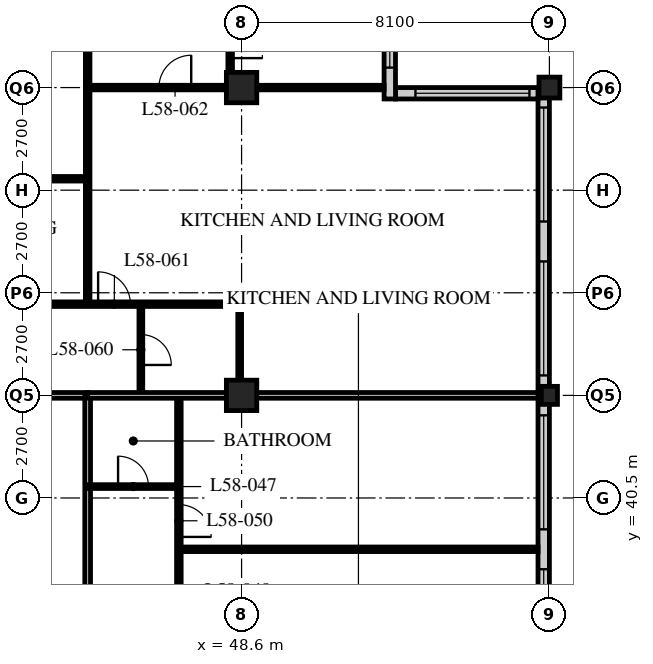
"""IFC4 building model, lengths in metres.
Left out: names, types, materials, properties, quantities, classifications, styles, units other than length and angle.
Written with IfcOpenShell. Run it as: python <this file> out.ifc"""

import sys

from ifc_helpers import new_model, si_unit, direction, frame, frame_2d, origin, origin_2d, place, context, subcontext, project, spatial, rectangle, hollow_rectangle, i_section, extrude, element, fill, save


model = new_model("IFC4")
c1 = context("Model", 3, precision=1e-05, world=origin(), true_north=direction((0.0, 1.0)))
c2 = subcontext(c1, "Body", "Model", "MODEL_VIEW")
j1 = project(units=[si_unit("LENGTHUNIT", "METRE"), si_unit("PLANEANGLEUNIT", "RADIAN")], contexts=[c1])
p1 = place(None, origin())
s1 = spatial("IfcSite", under=j1, at=p1, CompositionType="ELEMENT")
p2 = place(p1, origin())
s2 = spatial("IfcBuilding", under=s1, at=p2, CompositionType="ELEMENT")
p3 = place(p2, frame((0.0, 0.0, 224.4)))
s3 = spatial("IfcBuildingStorey", under=s2, at=p3, CompositionType="ELEMENT", Elevation=224.4)
for number, where, z_axis, x_axis in (
    (1, (48.6, 43.2, 0.0), (0.0, 0.0, 1.0), (1.0, 0.0, 0.0)),
    (2, (48.6, 51.3, 0.0), (0.0, 0.0, 1.0), (1.0, 0.0, 0.0)),
):
    element("IfcColumn", number, at=place(p3, frame(where, z_axis=z_axis, x_axis=x_axis)), inside=s3, PredefinedType="COLUMN", context=c2, shape_type="SweptSolid", body=[
        extrude(hollow_rectangle(XDim=0.8, YDim=0.8, WallThickness=0.08, at=origin_2d()), origin(), (0.0, 0.0, 1.0), 3.6),
    ])
p4 = place(p3, frame((56.7, 43.2, 0.0), z_axis=(0.0, 0.0, 1.0), x_axis=(1.0, 0.0, 0.0)))
e3 = element("IfcColumn", 3, at=p4, inside=s3, PredefinedType="COLUMN", context=c2, shape_type="SweptSolid", body=[
    extrude(i_section(OverallWidth=0.424, OverallDepth=0.475, WebThickness=0.048, FlangeThickness=0.077, FilletRadius=0.015, at=origin_2d()), origin(), (0.0, 0.0, 1.0), 3.6),
])
p5 = place(p3, frame((56.7, 51.3, 0.0), z_axis=(0.0, 0.0, 1.0), x_axis=(1.0, 0.0, 0.0)))
e4 = element("IfcColumn", 4, at=p5, inside=s3, PredefinedType="COLUMN", context=c2, shape_type="SweptSolid", body=[
    extrude(hollow_rectangle(XDim=0.55, YDim=0.55, WallThickness=0.045, at=origin_2d()), origin(), (0.0, 0.0, 1.0), 3.6),
])
p6 = place(p3, frame((56.55, 19.2, 0.0), z_axis=(0.0, 0.0, 1.0), x_axis=(0.0, 1.0, 0.0)))
e5 = element("IfcWall", 5, at=p6, inside=s3, PredefinedType="SOLIDWALL", context=c2, shape_type="SweptSolid", body=[
    extrude(rectangle(XDim=32.1, YDim=0.3, at=frame_2d((16.05, 0.0))), origin(), (0.0, 0.0, 1.0), 3.39),
])
p7 = place(p6, frame((0.225, 0.0, 0.6)))
e6 = element("IfcOpeningElement", 6, at=p7, cuts=e5, PredefinedType="OPENING", context=c2, shape_type="SweptSolid", body=[
    extrude(rectangle(XDim=3.0, YDim=2.0, at=frame_2d((1.5, 1.0))), frame((0.0, 0.16, 0.0), z_axis=(0.0, -1.0, 0.0), x_axis=(1.0, 0.0, 0.0)), (0.0, 0.0, 1.0), 0.32),
])
p8 = place(p6, frame((4.275, 0.0, 0.6)))
e7 = element("IfcOpeningElement", 7, at=p8, cuts=e5, PredefinedType="OPENING", context=c2, shape_type="SweptSolid", body=[
    extrude(rectangle(XDim=3.0, YDim=2.0, at=frame_2d((1.5, 1.0))), frame((0.0, 0.16, 0.0), z_axis=(0.0, -1.0, 0.0), x_axis=(1.0, 0.0, 0.0)), (0.0, 0.0, 1.0), 0.32),
])
p9 = place(p6, frame((8.325, 0.0, 0.6)))
e8 = element("IfcOpeningElement", 8, at=p9, cuts=e5, PredefinedType="OPENING", context=c2, shape_type="SweptSolid", body=[
    extrude(rectangle(XDim=3.0, YDim=2.0, at=frame_2d((1.5, 1.0))), frame((0.0, 0.16, 0.0), z_axis=(0.0, -1.0, 0.0), x_axis=(1.0, 0.0, 0.0)), (0.0, 0.0, 1.0), 0.32),
])
p10 = place(p6, frame((12.375, 0.0, 0.6)))
e9 = element("IfcOpeningElement", 9, at=p10, cuts=e5, PredefinedType="OPENING", context=c2, shape_type="SweptSolid", body=[
    extrude(rectangle(XDim=3.0, YDim=2.0, at=frame_2d((1.5, 1.0))), frame((0.0, 0.16, 0.0), z_axis=(0.0, -1.0, 0.0), x_axis=(1.0, 0.0, 0.0)), (0.0, 0.0, 1.0), 0.32),
])
p11 = place(p6, frame((16.425, 0.0, 0.6)))
e10 = element("IfcOpeningElement", 10, at=p11, cuts=e5, PredefinedType="OPENING", context=c2, shape_type="SweptSolid", body=[
    extrude(rectangle(XDim=3.0, YDim=2.0, at=frame_2d((1.5, 1.0))), frame((0.0, 0.16, 0.0), z_axis=(0.0, -1.0, 0.0), x_axis=(1.0, 0.0, 0.0)), (0.0, 0.0, 1.0), 0.32),
])
p12 = place(p6, frame((20.475, 0.0, 0.6)))
e11 = element("IfcOpeningElement", 11, at=p12, cuts=e5, PredefinedType="OPENING", context=c2, shape_type="SweptSolid", body=[
    extrude(rectangle(XDim=3.0, YDim=2.0, at=frame_2d((1.5, 1.0))), frame((0.0, 0.16, 0.0), z_axis=(0.0, -1.0, 0.0), x_axis=(1.0, 0.0, 0.0)), (0.0, 0.0, 1.0), 0.32),
])
p13 = place(p6, frame((24.525, 0.0, 0.6)))
e12 = element("IfcOpeningElement", 12, at=p13, cuts=e5, PredefinedType="OPENING", context=c2, shape_type="SweptSolid", body=[
    extrude(rectangle(XDim=3.0, YDim=2.0, at=frame_2d((1.5, 1.0))), frame((0.0, 0.16, 0.0), z_axis=(0.0, -1.0, 0.0), x_axis=(1.0, 0.0, 0.0)), (0.0, 0.0, 1.0), 0.32),
])
p14 = place(p6, frame((28.575, 0.0, 0.6)))
e13 = element("IfcOpeningElement", 13, at=p14, cuts=e5, PredefinedType="OPENING", context=c2, shape_type="SweptSolid", body=[
    extrude(rectangle(XDim=3.0, YDim=2.0, at=frame_2d((1.5, 1.0))), frame((0.0, 0.16, 0.0), z_axis=(0.0, -1.0, 0.0), x_axis=(1.0, 0.0, 0.0)), (0.0, 0.0, 1.0), 0.32),
])
p15 = place(p3, frame((56.4, 51.15, 0.0), z_axis=(0.0, 0.0, 1.0), x_axis=(-1.0, 0.0, 0.0)))
e14 = element("IfcWall", 14, at=p15, inside=s3, PredefinedType="SOLIDWALL", context=c2, shape_type="SweptSolid", body=[
    extrude(rectangle(XDim=3.75, YDim=0.3, at=frame_2d((1.875, 0.0))), origin(), (0.0, 0.0, 1.0), 3.39),
])
p16 = place(p15, frame((0.225, 0.0, 0.6)))
e15 = element("IfcOpeningElement", 15, at=p16, cuts=e14, PredefinedType="OPENING", context=c2, shape_type="SweptSolid", body=[
    extrude(rectangle(XDim=3.0, YDim=2.0, at=frame_2d((1.5, 1.0))), frame((0.0, 0.16, 0.0), z_axis=(0.0, -1.0, 0.0), x_axis=(1.0, 0.0, 0.0)), (0.0, 0.0, 1.0), 0.32),
])
p17 = place(p3, frame((52.5, 51.0, 0.0), z_axis=(0.0, 0.0, 1.0), x_axis=(0.0, 1.0, 0.0)))
e16 = element("IfcWall", 16, at=p17, inside=s3, PredefinedType="SOLIDWALL", context=c2, shape_type="SweptSolid", body=[
    extrude(rectangle(XDim=4.35, YDim=0.3, at=frame_2d((2.175, 0.0))), origin(), (0.0, 0.0, 1.0), 3.39),
])
p18 = place(p17, frame((0.825, 0.0, 0.6)))
e17 = element("IfcOpeningElement", 17, at=p18, cuts=e16, PredefinedType="OPENING", context=c2, shape_type="SweptSolid", body=[
    extrude(rectangle(XDim=3.0, YDim=2.0, at=frame_2d((1.5, 1.0))), frame((0.0, 0.16, 0.0), z_axis=(0.0, -1.0, 0.0), x_axis=(1.0, 0.0, 0.0)), (0.0, 0.0, 1.0), 0.32),
])
p19 = place(p3, frame((8.1, 43.2, 0.0), z_axis=(0.0, 0.0, 1.0), x_axis=(1.0, 0.0, 0.0)))
e18 = element("IfcWall", 18, at=p19, inside=s3, PredefinedType="PARTITIONING", context=c2, shape_type="SweptSolid", body=[
    extrude(rectangle(XDim=36.45, YDim=0.15, at=frame_2d((18.225, 0.0))), origin(), (0.0, 0.0, 1.0), 2.628),
])
p20 = place(p19, frame((4.45, 0.0, 0.0)))
e19 = element("IfcOpeningElement", 19, at=p20, cuts=e18, PredefinedType="OPENING", context=c2, shape_type="SweptSolid", body=[
    extrude(rectangle(XDim=1.0, YDim=2.1, at=frame_2d((0.5, 1.05))), frame((0.0, 0.085, 0.0), z_axis=(0.0, -1.0, 0.0), x_axis=(1.0, 0.0, 0.0)), (0.0, 0.0, 1.0), 0.17),
])
p21 = place(p19, frame((17.1, 0.0, 0.0)))
e20 = element("IfcOpeningElement", 20, at=p21, cuts=e18, PredefinedType="OPENING", context=c2, shape_type="SweptSolid", body=[
    extrude(rectangle(XDim=1.0, YDim=2.1, at=frame_2d((0.5, 1.05))), frame((0.0, 0.085, 0.0), z_axis=(0.0, -1.0, 0.0), x_axis=(1.0, 0.0, 0.0)), (0.0, 0.0, 1.0), 0.17),
])
p22 = place(p19, frame((29.05, 0.0, 0.0)))
e21 = element("IfcOpeningElement", 21, at=p22, cuts=e18, PredefinedType="OPENING", context=c2, shape_type="SweptSolid", body=[
    extrude(rectangle(XDim=1.0, YDim=2.1, at=frame_2d((0.5, 1.05))), frame((0.0, 0.085, 0.0), z_axis=(0.0, -1.0, 0.0), x_axis=(1.0, 0.0, 0.0)), (0.0, 0.0, 1.0), 0.17),
])
p23 = place(p19, frame((33.925, 0.0, 0.0)))
e22 = element("IfcOpeningElement", 22, at=p23, cuts=e18, PredefinedType="OPENING", context=c2, shape_type="SweptSolid", body=[
    extrude(rectangle(XDim=1.0, YDim=2.1, at=frame_2d((0.5, 1.05))), frame((0.0, 0.085, 0.0), z_axis=(0.0, -1.0, 0.0), x_axis=(1.0, 0.0, 0.0)), (0.0, 0.0, 1.0), 0.17),
])
p24 = place(p19, frame((1.525, 0.0, 0.0)))
e23 = element("IfcOpeningElement", 23, at=p24, cuts=e18, PredefinedType="OPENING", context=c2, shape_type="SweptSolid", body=[
    extrude(rectangle(XDim=1.0, YDim=2.1, at=frame_2d((0.5, 1.05))), frame((0.0, 0.085, 0.0), z_axis=(0.0, -1.0, 0.0), x_axis=(1.0, 0.0, 0.0)), (0.0, 0.0, 1.0), 0.17),
])
p25 = place(p3, frame((44.55, 18.9, 0.0), z_axis=(0.0, 0.0, 1.0), x_axis=(0.0, 1.0, 0.0)))
e24 = element("IfcWall", 24, at=p25, inside=s3, PredefinedType="PARTITIONING", context=c2, shape_type="SweptSolid", body=[
    extrude(rectangle(XDim=24.3, YDim=0.15, at=frame_2d((12.15, 0.0))), origin(), (0.0, 0.0, 1.0), 3.39),
])
p26 = place(p25, frame((0.4, 0.0, 0.0)))
e25 = element("IfcOpeningElement", 25, at=p26, cuts=e24, PredefinedType="OPENING", context=c2, shape_type="SweptSolid", body=[
    extrude(rectangle(XDim=1.0, YDim=2.1, at=frame_2d((0.5, 1.05))), frame((0.0, 0.085, 0.0), z_axis=(0.0, -1.0, 0.0), x_axis=(1.0, 0.0, 0.0)), (0.0, 0.0, 1.0), 0.17),
])
p27 = place(p25, frame((16.6, 0.0, 0.0)))
e26 = element("IfcOpeningElement", 26, at=p27, cuts=e24, PredefinedType="OPENING", context=c2, shape_type="SweptSolid", body=[
    extrude(rectangle(XDim=1.0, YDim=2.1, at=frame_2d((0.5, 1.05))), frame((0.0, 0.085, 0.0), z_axis=(0.0, -1.0, 0.0), x_axis=(1.0, 0.0, 0.0)), (0.0, 0.0, 1.0), 0.17),
])
p28 = place(p3, frame((46.95, 18.9, 0.0), z_axis=(0.0, 0.0, 1.0), x_axis=(0.0, 1.0, 0.0)))
e27 = element("IfcWall", 27, at=p28, inside=s3, PredefinedType="PARTITIONING", context=c2, shape_type="SweptSolid", body=[
    extrude(rectangle(XDim=24.3, YDim=0.12, at=frame_2d((12.15, 0.0))), origin(), (0.0, 0.0, 1.0), 3.39),
])
p29 = place(p28, frame((0.975, 0.0, 0.0)))
e28 = element("IfcOpeningElement", 28, at=p29, cuts=e27, PredefinedType="OPENING", context=c2, shape_type="SweptSolid", body=[
    extrude(rectangle(XDim=0.85, YDim=2.1, at=frame_2d((0.425, 1.05))), frame((0.0, 0.07, 0.0), z_axis=(0.0, -1.0, 0.0), x_axis=(1.0, 0.0, 0.0)), (0.0, 0.0, 1.0), 0.14),
])
p30 = place(p28, frame((8.425, 0.0, 0.0)))
e29 = element("IfcOpeningElement", 29, at=p30, cuts=e27, PredefinedType="OPENING", context=c2, shape_type="SweptSolid", body=[
    extrude(rectangle(XDim=0.85, YDim=2.1, at=frame_2d((0.425, 1.05))), frame((0.0, 0.07, 0.0), z_axis=(0.0, -1.0, 0.0), x_axis=(1.0, 0.0, 0.0)), (0.0, 0.0, 1.0), 0.14),
])
p31 = place(p28, frame((12.475, 0.0, 0.0)))
e30 = element("IfcOpeningElement", 30, at=p31, cuts=e27, PredefinedType="OPENING", context=c2, shape_type="SweptSolid", body=[
    extrude(rectangle(XDim=0.85, YDim=2.1, at=frame_2d((0.425, 1.05))), frame((0.0, 0.07, 0.0), z_axis=(0.0, -1.0, 0.0), x_axis=(1.0, 0.0, 0.0)), (0.0, 0.0, 1.0), 0.14),
])
p32 = place(p28, frame((17.175, 0.0, 0.0)))
e31 = element("IfcOpeningElement", 31, at=p32, cuts=e27, PredefinedType="OPENING", context=c2, shape_type="SweptSolid", body=[
    extrude(rectangle(XDim=0.85, YDim=2.1, at=frame_2d((0.425, 1.05))), frame((0.0, 0.07, 0.0), z_axis=(0.0, -1.0, 0.0), x_axis=(1.0, 0.0, 0.0)), (0.0, 0.0, 1.0), 0.14),
])
p33 = place(p28, frame((20.575, 0.0, 0.0)))
e32 = element("IfcOpeningElement", 32, at=p33, cuts=e27, PredefinedType="OPENING", context=c2, shape_type="SweptSolid", body=[
    extrude(rectangle(XDim=0.85, YDim=2.1, at=frame_2d((0.425, 1.05))), frame((0.0, 0.07, 0.0), z_axis=(0.0, -1.0, 0.0), x_axis=(1.0, 0.0, 0.0)), (0.0, 0.0, 1.0), 0.14),
])
p34 = place(p3, frame((44.55, 40.8, 0.0), z_axis=(0.0, 0.0, 1.0), x_axis=(1.0, 0.0, 0.0)))
e33 = element("IfcWall", 33, at=p34, inside=s3, PredefinedType="PARTITIONING", context=c2, shape_type="SweptSolid", body=[
    extrude(rectangle(XDim=2.4, YDim=0.1, at=frame_2d((1.2, 0.0))), origin(), (0.0, 0.0, 1.0), 3.39),
])
p35 = place(p34, frame((0.8, 0.0, 0.0)))
e34 = element("IfcOpeningElement", 34, at=p35, cuts=e33, PredefinedType="OPENING", context=c2, shape_type="SweptSolid", body=[
    extrude(rectangle(XDim=0.8, YDim=2.1, at=frame_2d((0.4, 1.05))), frame((0.0, 0.06, 0.0), z_axis=(0.0, -1.0, 0.0), x_axis=(1.0, 0.0, 0.0)), (0.0, 0.0, 1.0), 0.12),
])
p36 = place(p3, frame((46.95, 39.15, 0.0), z_axis=(0.0, 0.0, 1.0), x_axis=(1.0, 0.0, 0.0)))
e35 = element("IfcWall", 35, at=p36, inside=s3, PredefinedType="PARTITIONING", context=c2, shape_type="SweptSolid", body=[
    extrude(rectangle(XDim=9.45, YDim=0.12, at=frame_2d((4.725, 0.0))), origin(), (0.0, 0.0, 1.0), 3.39),
])
p37 = place(p3, frame((40.5, 45.6, 0.0), z_axis=(0.0, 0.0, 1.0), x_axis=(1.0, 0.0, 0.0)))
e36 = element("IfcWall", 36, at=p37, inside=s3, PredefinedType="PARTITIONING", context=c2, shape_type="SweptSolid", body=[
    extrude(rectangle(XDim=8.05, YDim=0.12, at=frame_2d((4.025, 0.0))), origin(), (0.0, 0.0, 1.0), 3.39),
])
p38 = place(p37, frame((0.475, 0.0, 0.0)))
e37 = element("IfcOpeningElement", 37, at=p38, cuts=e36, PredefinedType="OPENING", context=c2, shape_type="SweptSolid", body=[
    extrude(rectangle(XDim=0.85, YDim=2.1, at=frame_2d((0.425, 1.05))), frame((0.0, 0.07, 0.0), z_axis=(0.0, -1.0, 0.0), x_axis=(1.0, 0.0, 0.0)), (0.0, 0.0, 1.0), 0.14),
])
p39 = place(p37, frame((4.325, 0.0, 0.0)))
e38 = element("IfcOpeningElement", 38, at=p39, cuts=e36, PredefinedType="OPENING", context=c2, shape_type="SweptSolid", body=[
    extrude(rectangle(XDim=0.85, YDim=2.1, at=frame_2d((0.425, 1.05))), frame((0.0, 0.07, 0.0), z_axis=(0.0, -1.0, 0.0), x_axis=(1.0, 0.0, 0.0)), (0.0, 0.0, 1.0), 0.14),
])
p40 = place(p3, frame((45.95, 43.2, 0.0), z_axis=(0.0, 0.0, 1.0), x_axis=(0.0, 1.0, 0.0)))
e39 = element("IfcWall", 39, at=p40, inside=s3, PredefinedType="PARTITIONING", context=c2, shape_type="SweptSolid", body=[
    extrude(rectangle(XDim=2.4, YDim=0.1, at=frame_2d((1.2, 0.0))), origin(), (0.0, 0.0, 1.0), 3.39),
])
p41 = place(p40, frame((0.8, 0.0, 0.0)))
e40 = element("IfcOpeningElement", 40, at=p41, cuts=e39, PredefinedType="OPENING", context=c2, shape_type="SweptSolid", body=[
    extrude(rectangle(XDim=0.8, YDim=2.1, at=frame_2d((0.4, 1.05))), frame((0.0, 0.06, 0.0), z_axis=(0.0, -1.0, 0.0), x_axis=(1.0, 0.0, 0.0)), (0.0, 0.0, 1.0), 0.12),
])
p42 = place(p3, frame((48.55, 43.2, 0.0), z_axis=(0.0, 0.0, 1.0), x_axis=(0.0, 1.0, 0.0)))
e41 = element("IfcWall", 41, at=p42, inside=s3, PredefinedType="PARTITIONING", context=c2, shape_type="SweptSolid", body=[
    extrude(rectangle(XDim=2.4, YDim=0.1, at=frame_2d((1.2, 0.0))), origin(), (0.0, 0.0, 1.0), 2.628),
])
p43 = place(p3, frame((44.55, 45.6, 0.0), z_axis=(0.0, 0.0, 1.0), x_axis=(0.0, 1.0, 0.0)))
e42 = element("IfcWall", 42, at=p43, inside=s3, PredefinedType="PARTITIONING", context=c2, shape_type="SweptSolid", body=[
    extrude(rectangle(XDim=13.5, YDim=0.12, at=frame_2d((6.75, 0.0))), origin(), (0.0, 0.0, 1.0), 3.39),
])
p44 = place(p3, frame((44.55, 51.3, 0.0), z_axis=(0.0, 0.0, 1.0), x_axis=(1.0, 0.0, 0.0)))
e43 = element("IfcWall", 43, at=p44, inside=s3, PredefinedType="PARTITIONING", context=c2, shape_type="SweptSolid", body=[
    extrude(rectangle(XDim=7.8, YDim=0.12, at=frame_2d((3.9, 0.0))), origin(), (0.0, 0.0, 1.0), 2.628),
])
p45 = place(p44, frame((1.875, 0.0, 0.0)))
e44 = element("IfcOpeningElement", 44, at=p45, cuts=e43, PredefinedType="OPENING", context=c2, shape_type="SweptSolid", body=[
    extrude(rectangle(XDim=0.85, YDim=2.1, at=frame_2d((0.425, 1.05))), frame((0.0, 0.07, 0.0), z_axis=(0.0, -1.0, 0.0), x_axis=(1.0, 0.0, 0.0)), (0.0, 0.0, 1.0), 0.14),
])
p46 = place(p3, frame((44.55, 43.2, 0.0), z_axis=(0.0, 0.0, 1.0), x_axis=(1.0, 0.0, 0.0)))
e45 = element("IfcWall", 45, at=p46, inside=s3, PredefinedType="PARTITIONING", context=c2, shape_type="SweptSolid", body=[
    extrude(rectangle(XDim=11.85, YDim=0.15, at=frame_2d((5.925, 0.0))), origin(), (0.0, 0.0, 1.0), 2.628),
])
p47 = place(p3, frame((48.3, 51.3, 0.0), z_axis=(0.0, 0.0, 1.0), x_axis=(0.0, 1.0, 0.0)))
e46 = element("IfcWall", 46, at=p47, inside=s3, PredefinedType="PARTITIONING", context=c2, shape_type="SweptSolid", body=[
    extrude(rectangle(XDim=3.75, YDim=0.12, at=frame_2d((1.875, 0.0))), origin(), (0.0, 0.0, 1.0), 3.39),
])
p48 = place(p47, frame((0.775, 0.0, 0.0)))
e47 = element("IfcOpeningElement", 47, at=p48, cuts=e46, PredefinedType="OPENING", context=c2, shape_type="SweptSolid", body=[
    extrude(rectangle(XDim=0.85, YDim=2.1, at=frame_2d((0.425, 1.05))), frame((0.0, 0.07, 0.0), z_axis=(0.0, -1.0, 0.0), x_axis=(1.0, 0.0, 0.0)), (0.0, 0.0, 1.0), 0.14),
])
p49 = place(p3, frame((40.5, 48.9, 0.0), z_axis=(0.0, 0.0, 1.0), x_axis=(1.0, 0.0, 0.0)))
e48 = element("IfcWall", 48, at=p49, inside=s3, PredefinedType="PARTITIONING", context=c2, shape_type="SweptSolid", body=[
    extrude(rectangle(XDim=4.05, YDim=0.12, at=frame_2d((2.025, 0.0))), origin(), (0.0, 0.0, 1.0), 3.39),
])
p50 = place(p49, frame((1.6, 0.0, 0.0)))
e49 = element("IfcOpeningElement", 49, at=p50, cuts=e48, PredefinedType="OPENING", context=c2, shape_type="SweptSolid", body=[
    extrude(rectangle(XDim=0.85, YDim=2.1, at=frame_2d((0.425, 1.05))), frame((0.0, 0.07, 0.0), z_axis=(0.0, -1.0, 0.0), x_axis=(1.0, 0.0, 0.0)), (0.0, 0.0, 1.0), 0.14),
])
p51 = place(p11, origin())
e50 = element("IfcWindow", 50, at=p51, inside=s3, PartitioningType="SINGLE_PANEL", PredefinedType="WINDOW", context=c2, shape_type="SweptSolid", body=[
    extrude(rectangle(XDim=3.0, YDim=2.0, at=frame_2d((1.5, 1.0))), frame((0.0, 0.03, 0.0), z_axis=(0.0, -1.0, 0.0), x_axis=(1.0, 0.0, 0.0)), (0.0, 0.0, 1.0), 0.06),
])
fill(e10, e50)
p52 = place(p12, origin())
e51 = element("IfcWindow", 51, at=p52, inside=s3, PartitioningType="SINGLE_PANEL", PredefinedType="WINDOW", context=c2, shape_type="SweptSolid", body=[
    extrude(rectangle(XDim=3.0, YDim=2.0, at=frame_2d((1.5, 1.0))), frame((0.0, 0.03, 0.0), z_axis=(0.0, -1.0, 0.0), x_axis=(1.0, 0.0, 0.0)), (0.0, 0.0, 1.0), 0.06),
])
fill(e11, e51)
p53 = place(p13, origin())
e52 = element("IfcWindow", 52, at=p53, inside=s3, PartitioningType="SINGLE_PANEL", PredefinedType="WINDOW", context=c2, shape_type="SweptSolid", body=[
    extrude(rectangle(XDim=3.0, YDim=2.0, at=frame_2d((1.5, 1.0))), frame((0.0, 0.03, 0.0), z_axis=(0.0, -1.0, 0.0), x_axis=(1.0, 0.0, 0.0)), (0.0, 0.0, 1.0), 0.06),
])
fill(e12, e52)
p54 = place(p14, origin())
e53 = element("IfcWindow", 53, at=p54, inside=s3, PartitioningType="SINGLE_PANEL", PredefinedType="WINDOW", context=c2, shape_type="SweptSolid", body=[
    extrude(rectangle(XDim=3.0, YDim=2.0, at=frame_2d((1.5, 1.0))), frame((0.0, 0.03, 0.0), z_axis=(0.0, -1.0, 0.0), x_axis=(1.0, 0.0, 0.0)), (0.0, 0.0, 1.0), 0.06),
])
fill(e13, e53)
p55 = place(p16, origin())
e54 = element("IfcWindow", 54, at=p55, inside=s3, PartitioningType="SINGLE_PANEL", PredefinedType="WINDOW", context=c2, shape_type="SweptSolid", body=[
    extrude(rectangle(XDim=3.0, YDim=2.0, at=frame_2d((1.5, 1.0))), frame((0.0, 0.03, 0.0), z_axis=(0.0, -1.0, 0.0), x_axis=(1.0, 0.0, 0.0)), (0.0, 0.0, 1.0), 0.06),
])
fill(e15, e54)
p56 = place(p18, origin())
e55 = element("IfcWindow", 55, at=p56, inside=s3, PartitioningType="SINGLE_PANEL", PredefinedType="WINDOW", context=c2, shape_type="SweptSolid", body=[
    extrude(rectangle(XDim=3.0, YDim=2.0, at=frame_2d((1.5, 1.0))), frame((0.0, 0.03, 0.0), z_axis=(0.0, -1.0, 0.0), x_axis=(1.0, 0.0, 0.0)), (0.0, 0.0, 1.0), 0.06),
])
fill(e17, e55)
p57 = place(p35, origin())
e56 = element("IfcDoor", 56, at=p57, inside=s3, OperationType="SINGLE_SWING_LEFT", PredefinedType="DOOR", context=c2, shape_type="SweptSolid", body=[
    extrude(rectangle(XDim=0.8, YDim=2.1, at=frame_2d((0.4, 1.05))), frame((0.0, 0.025, 0.0), z_axis=(0.0, -1.0, 0.0), x_axis=(1.0, 0.0, 0.0)), (0.0, 0.0, 1.0), 0.05),
])
fill(e34, e56)
p58 = place(p33, origin())
e57 = element("IfcDoor", 57, at=p58, inside=s3, OperationType="SINGLE_SWING_RIGHT", PredefinedType="DOOR", context=c2, shape_type="SweptSolid", body=[
    extrude(rectangle(XDim=0.85, YDim=2.1, at=frame_2d((0.425, 1.05))), frame((0.0, 0.025, 0.0), z_axis=(0.0, -1.0, 0.0), x_axis=(1.0, 0.0, 0.0)), (0.0, 0.0, 1.0), 0.05),
])
fill(e32, e57)
p59 = place(p41, origin())
e58 = element("IfcDoor", 58, at=p59, inside=s3, OperationType="SINGLE_SWING_RIGHT", PredefinedType="DOOR", context=c2, shape_type="SweptSolid", body=[
    extrude(rectangle(XDim=0.8, YDim=2.1, at=frame_2d((0.4, 1.05))), frame((0.0, 0.025, 0.0), z_axis=(0.0, -1.0, 0.0), x_axis=(1.0, 0.0, 0.0)), (0.0, 0.0, 1.0), 0.05),
])
fill(e40, e58)
p60 = place(p39, origin())
e59 = element("IfcDoor", 59, at=p60, inside=s3, OperationType="SINGLE_SWING_LEFT", PredefinedType="DOOR", context=c2, shape_type="SweptSolid", body=[
    extrude(rectangle(XDim=0.85, YDim=2.1, at=frame_2d((0.425, 1.05))), frame((0.0, 0.025, 0.0), z_axis=(0.0, -1.0, 0.0), x_axis=(1.0, 0.0, 0.0)), (0.0, 0.0, 1.0), 0.05),
])
fill(e38, e59)
p61 = place(p45, origin())
e60 = element("IfcDoor", 60, at=p61, inside=s3, OperationType="SINGLE_SWING_RIGHT", PredefinedType="DOOR", context=c2, shape_type="SweptSolid", body=[
    extrude(rectangle(XDim=0.85, YDim=2.1, at=frame_2d((0.425, 1.05))), frame((0.0, 0.025, 0.0), z_axis=(0.0, -1.0, 0.0), x_axis=(1.0, 0.0, 0.0)), (0.0, 0.0, 1.0), 0.05),
])
fill(e44, e60)
p62 = place(p48, origin())
e61 = element("IfcDoor", 61, at=p62, inside=s3, OperationType="SINGLE_SWING_RIGHT", PredefinedType="DOOR", context=c2, shape_type="SweptSolid", body=[
    extrude(rectangle(XDim=0.85, YDim=2.1, at=frame_2d((0.425, 1.05))), frame((0.0, 0.025, 0.0), z_axis=(0.0, -1.0, 0.0), x_axis=(1.0, 0.0, 0.0)), (0.0, 0.0, 1.0), 0.05),
])
fill(e47, e61)
save(model, sys.argv[1])
